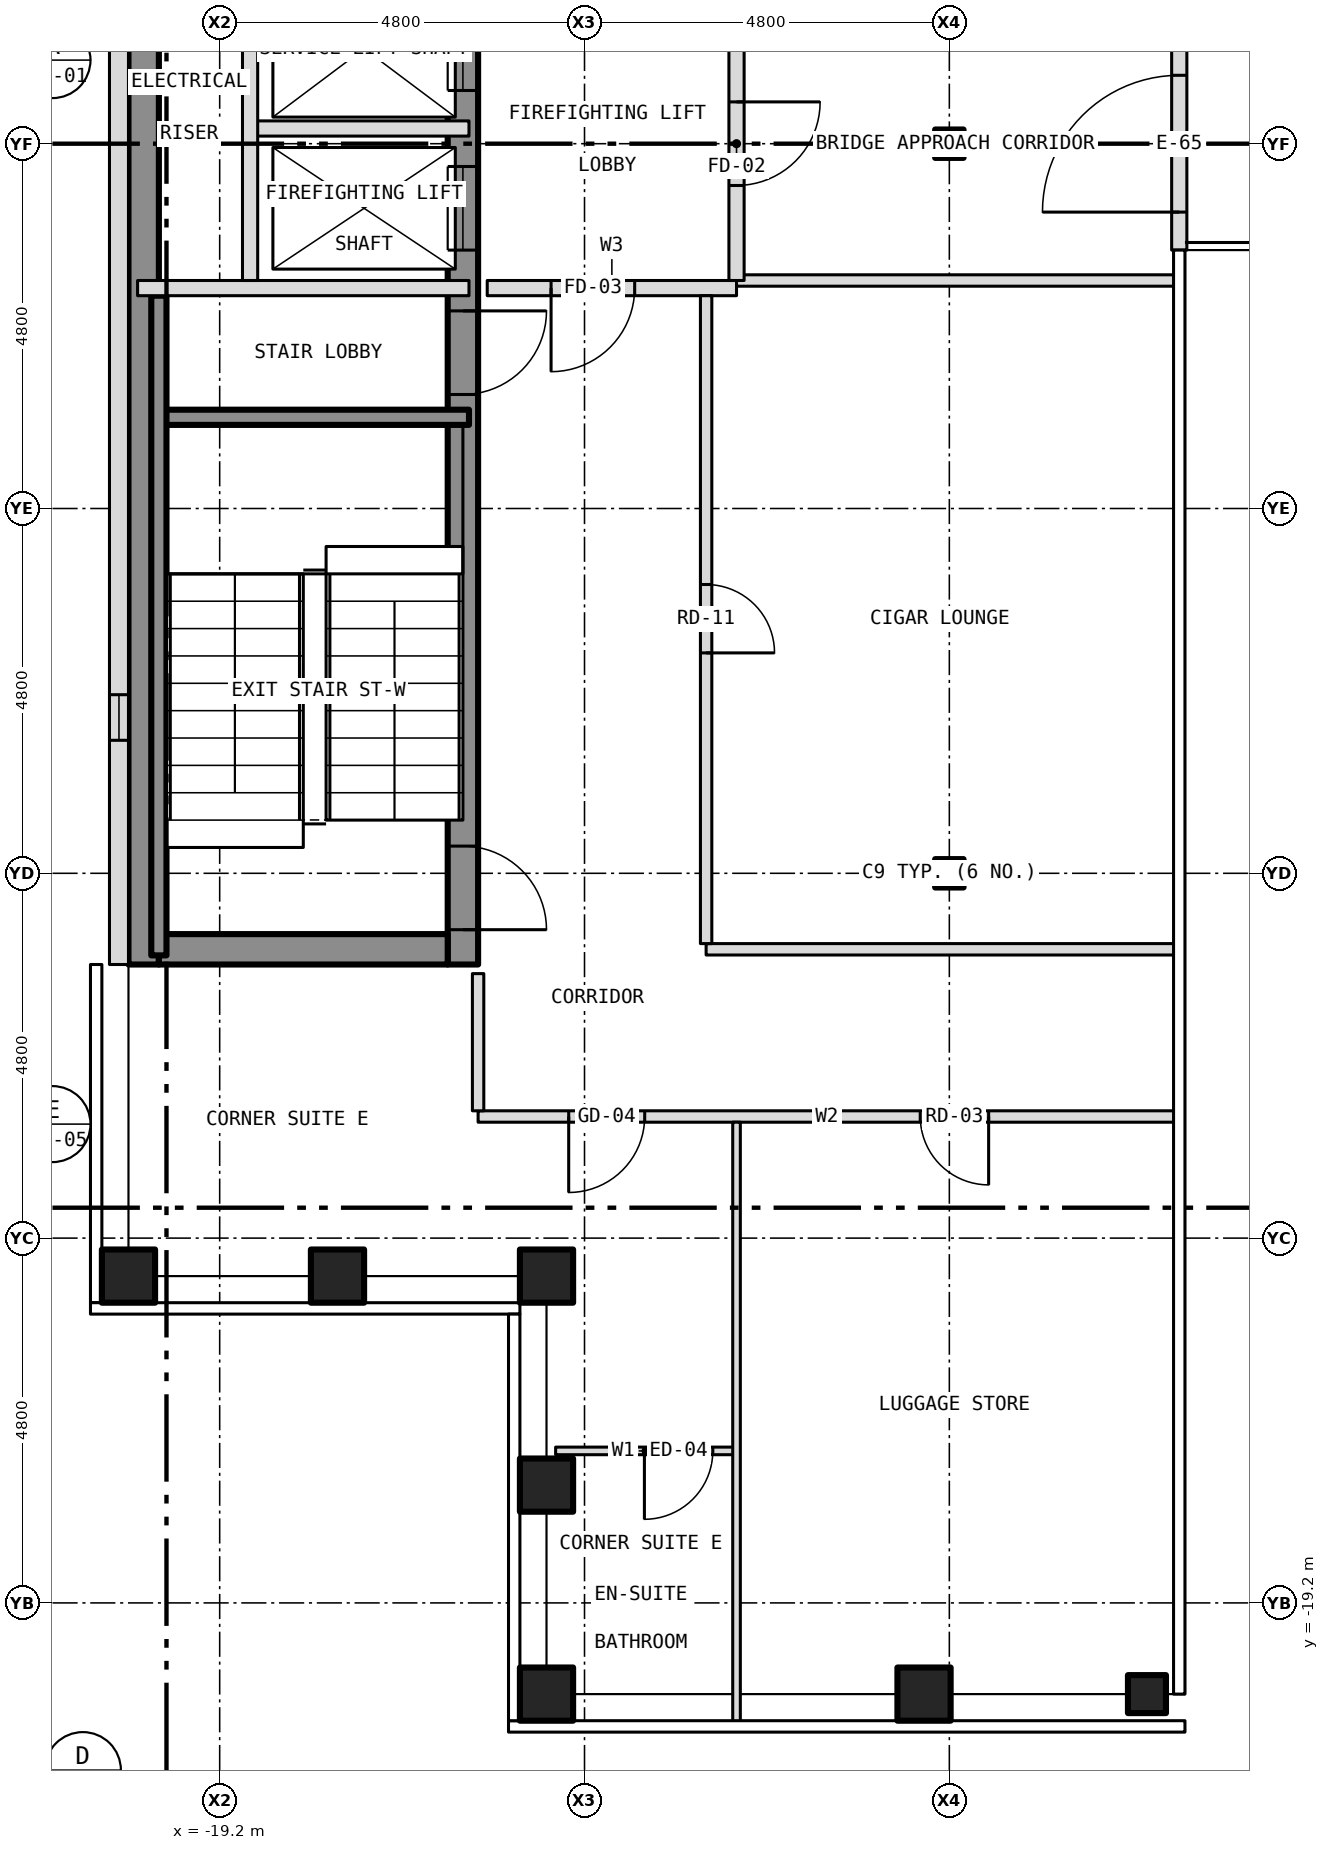
"""IFC4 building model, lengths in metres.
Left out: names, types, materials, properties, quantities, classifications, styles, units other than length and angle.
Written with IfcOpenShell. Run it as: python <this file> out.ifc"""

import sys

from ifc_helpers import new_model, si_unit, direction, frame, frame_2d, origin, origin_2d, place, context, subcontext, project, spatial, rectangle, hollow_rectangle, i_section, extrude, element, fill, save


model = new_model("IFC4")
c1 = context("Model", 3, precision=1e-05, world=origin(), true_north=direction((0.0, 1.0)))
c2 = subcontext(c1, "Body", "Model", "MODEL_VIEW")
j1 = project(units=[si_unit("LENGTHUNIT", "METRE"), si_unit("PLANEANGLEUNIT", "RADIAN")], contexts=[c1])
p1 = place(None, origin())
s1 = spatial("IfcSite", under=j1, at=p1, CompositionType="ELEMENT")
p2 = place(p1, origin())
s2 = spatial("IfcBuilding", under=s1, at=p2, CompositionType="ELEMENT")
p3 = place(p2, frame((0.0, 0.0, 233.0)))
s3 = spatial("IfcBuildingStorey", under=s2, at=p3, CompositionType="ELEMENT", Elevation=233.0)
for number, where, z_axis, x_axis in (
    (1, (-14.9, -20.4, -0.15), (0.0, 0.0, 1.0), (1.0, 0.0, 0.0)),
    (2, (-9.933, -20.4, -0.15), (0.0, 0.0, 1.0), (1.0, 0.0, 0.0)),
    (3, (-20.4, -14.9, -0.15), (0.0, 0.0, 1.0), (1.0, 0.0, 0.0)),
    (4, (-14.9, -14.9, -0.15), (0.0, 0.0, 1.0), (1.0, 0.0, 0.0)),
    (5, (-14.9, -17.65, -0.15), (0.0, 0.0, 1.0), (1.0, 0.0, 0.0)),
    (6, (-17.65, -14.9, -0.15), (0.0, 0.0, 1.0), (1.0, 0.0, 0.0)),
):
    element("IfcColumn", number, at=place(p3, frame(where, z_axis=z_axis, x_axis=x_axis)), inside=s3, PredefinedType="COLUMN", context=c2, shape_type="SweptSolid", body=[
        extrude(hollow_rectangle(XDim=0.7, YDim=0.7, WallThickness=0.04, at=origin_2d()), origin(), (0.0, 0.0, 1.0), 3.35),
    ])
p4 = place(p3, frame((-7.0, -20.4, -0.15), z_axis=(0.0, 0.0, 1.0), x_axis=(1.0, 0.0, 0.0)))
e7 = element("IfcColumn", 7, at=p4, inside=s3, PredefinedType="COLUMN", context=c2, shape_type="SweptSolid", body=[
    extrude(hollow_rectangle(XDim=0.5, YDim=0.5, WallThickness=0.03, at=origin_2d()), origin(), (0.0, 0.0, 1.0), 3.35),
])
for number, where, z_axis, x_axis in (
    (8, (-9.6, -9.6, -0.15), (0.0, 0.0, 1.0), (1.0, 0.0, 0.0)),
    (9, (-9.6, 0.0, -0.15), (0.0, 0.0, 1.0), (1.0, 0.0, 0.0)),
):
    element("IfcColumn", number, at=place(p3, frame(where, z_axis=z_axis, x_axis=x_axis)), inside=s3, PredefinedType="COLUMN", context=c2, shape_type="SweptSolid", body=[
        extrude(i_section(OverallWidth=0.373, OverallDepth=0.373, WebThickness=0.016, FlangeThickness=0.026, at=origin_2d()), origin(), (0.0, 0.0, 1.0), 3.35),
    ])
p5 = place(p3, frame((-16.0, -10.8, 0.0), z_axis=(0.0, 0.0, 1.0), x_axis=(0.0, 1.0, 0.0)))
e10 = element("IfcWall", 10, at=p5, inside=s3, PredefinedType="SHEAR", context=c2, shape_type="SweptSolid", body=[
    extrude(rectangle(XDim=21.6, YDim=0.4, at=frame_2d((10.8, 0.0))), origin(), (0.0, 0.0, 1.0), 2.9),
])
p6 = place(p5, frame((9.4, 0.0, 0.0)))
e11 = element("IfcOpeningElement", 11, at=p6, cuts=e10, PredefinedType="OPENING", context=c2, shape_type="SweptSolid", body=[
    extrude(rectangle(XDim=1.1, YDim=2.1, at=frame_2d((0.55, 1.05))), frame((0.0, 0.212, 0.0), z_axis=(0.0, -1.0, 0.0), x_axis=(1.0, 0.0, 0.0)), (0.0, 0.0, 1.0), 0.424),
])
p7 = place(p5, frame((11.5, 0.0, 0.0)))
e12 = element("IfcOpeningElement", 12, at=p7, cuts=e10, PredefinedType="OPENING", context=c2, shape_type="SweptSolid", body=[
    extrude(rectangle(XDim=1.1, YDim=2.1, at=frame_2d((0.55, 1.05))), frame((0.0, 0.212, 0.0), z_axis=(0.0, -1.0, 0.0), x_axis=(1.0, 0.0, 0.0)), (0.0, 0.0, 1.0), 0.424),
])
p8 = place(p5, frame((13.6, 0.0, 0.0)))
e13 = element("IfcOpeningElement", 13, at=p8, cuts=e10, PredefinedType="OPENING", context=c2, shape_type="SweptSolid", body=[
    extrude(rectangle(XDim=1.1, YDim=2.1, at=frame_2d((0.55, 1.05))), frame((0.0, 0.212, 0.0), z_axis=(0.0, -1.0, 0.0), x_axis=(1.0, 0.0, 0.0)), (0.0, 0.0, 1.0), 0.424),
])
p9 = place(p5, frame((15.7, 0.0, 0.0)))
e14 = element("IfcOpeningElement", 14, at=p9, cuts=e10, PredefinedType="OPENING", context=c2, shape_type="SweptSolid", body=[
    extrude(rectangle(XDim=1.1, YDim=2.1, at=frame_2d((0.55, 1.05))), frame((0.0, 0.212, 0.0), z_axis=(0.0, -1.0, 0.0), x_axis=(1.0, 0.0, 0.0)), (0.0, 0.0, 1.0), 0.424),
])
p10 = place(p5, frame((17.8, 0.0, 0.0)))
e15 = element("IfcOpeningElement", 15, at=p10, cuts=e10, PredefinedType="OPENING", context=c2, shape_type="SweptSolid", body=[
    extrude(rectangle(XDim=1.1, YDim=2.1, at=frame_2d((0.55, 1.05))), frame((0.0, 0.212, 0.0), z_axis=(0.0, -1.0, 0.0), x_axis=(1.0, 0.0, 0.0)), (0.0, 0.0, 1.0), 0.424),
])
p11 = place(p5, frame((0.458, 0.0, 0.0)))
e16 = element("IfcOpeningElement", 16, at=p11, cuts=e10, PredefinedType="OPENING", context=c2, shape_type="SweptSolid", body=[
    extrude(rectangle(XDim=1.1, YDim=2.1, at=frame_2d((0.55, 1.05))), frame((0.0, 0.212, 0.0), z_axis=(0.0, -1.0, 0.0), x_axis=(1.0, 0.0, 0.0)), (0.0, 0.0, 1.0), 0.424),
])
p12 = place(p5, frame((7.5, 0.0, 0.0)))
e17 = element("IfcOpeningElement", 17, at=p12, cuts=e10, PredefinedType="OPENING", context=c2, shape_type="SweptSolid", body=[
    extrude(rectangle(XDim=1.1, YDim=2.1, at=frame_2d((0.55, 1.05))), frame((0.0, 0.212, 0.0), z_axis=(0.0, -1.0, 0.0), x_axis=(1.0, 0.0, 0.0)), (0.0, 0.0, 1.0), 0.424),
])
p13 = place(p5, frame((20.0, 0.0, 0.0)))
e18 = element("IfcOpeningElement", 18, at=p13, cuts=e10, PredefinedType="OPENING", context=c2, shape_type="SweptSolid", body=[
    extrude(rectangle(XDim=0.9, YDim=2.1, at=frame_2d((0.45, 1.05))), frame((0.0, 0.212, 0.0), z_axis=(0.0, -1.0, 0.0), x_axis=(1.0, 0.0, 0.0)), (0.0, 0.0, 1.0), 0.424),
])
p14 = place(p3, frame((-20.2, -10.8, 0.0), z_axis=(0.0, 0.0, 1.0), x_axis=(0.0, 1.0, 0.0)))
e19 = element("IfcWall", 19, at=p14, inside=s3, PredefinedType="SHEAR", context=c2, shape_type="SweptSolid", body=[
    extrude(rectangle(XDim=21.6, YDim=0.4, at=frame_2d((10.8, 0.0))), origin(), (0.0, 0.0, 1.0), 2.9),
])
p15 = place(p3, frame((-20.0, -10.6, 0.0), z_axis=(0.0, 0.0, 1.0), x_axis=(1.0, 0.0, 0.0)))
e20 = element("IfcWall", 20, at=p15, inside=s3, PredefinedType="SHEAR", context=c2, shape_type="SweptSolid", body=[
    extrude(rectangle(XDim=3.8, YDim=0.4, at=frame_2d((1.9, 0.0))), origin(), (0.0, 0.0, 1.0), 2.9),
])
p16 = place(p3, frame((-20.525, 10.8, 0.0), z_axis=(0.0, 0.0, 1.0), x_axis=(0.0, -1.0, 0.0)))
e21 = element("IfcWall", 21, at=p16, inside=s3, PredefinedType="SOLIDWALL", context=c2, shape_type="SweptSolid", body=[
    extrude(rectangle(XDim=21.6, YDim=0.25, at=frame_2d((10.8, 0.0))), origin(), (0.0, 0.0, 1.0), 3.5),
])
p17 = place(p16, frame((18.05, 0.0, 1.0)))
e22 = element("IfcOpeningElement", 22, at=p17, cuts=e21, PredefinedType="OPENING", context=c2, shape_type="SweptSolid", body=[
    extrude(rectangle(XDim=0.6, YDim=1.5, at=frame_2d((0.3, 0.75))), frame((0.0, 0.137, 0.0), z_axis=(0.0, -1.0, 0.0), x_axis=(1.0, 0.0, 0.0)), (0.0, 0.0, 1.0), 0.274),
])
p18 = place(p3, frame((-6.575, -1.4, 0.0), z_axis=(0.0, 0.0, 1.0), x_axis=(0.0, 1.0, 0.0)))
e23 = element("IfcWall", 23, at=p18, inside=s3, PredefinedType="SOLIDWALL", context=c2, shape_type="SweptSolid", body=[
    extrude(rectangle(XDim=2.8, YDim=0.2, at=frame_2d((1.4, 0.0))), origin(), (0.0, 0.0, 1.0), 3.5),
])
p19 = place(p18, frame((0.5, 0.0, 0.0)))
e24 = element("IfcOpeningElement", 24, at=p19, cuts=e23, PredefinedType="OPENING", context=c2, shape_type="SweptSolid", body=[
    extrude(rectangle(XDim=1.8, YDim=2.1, at=frame_2d((0.9, 1.05))), frame((0.0, 0.112, 0.0), z_axis=(0.0, -1.0, 0.0), x_axis=(1.0, 0.0, 0.0)), (0.0, 0.0, 1.0), 0.224),
])
p20 = place(p3, frame((-14.78, -17.2, 0.0), z_axis=(0.0, 0.0, 1.0), x_axis=(1.0, 0.0, 0.0)))
e25 = element("IfcWall", 25, at=p20, inside=s3, PredefinedType="PARTITIONING", context=c2, shape_type="SweptSolid", body=[
    extrude(rectangle(XDim=2.38, YDim=0.1, at=frame_2d((1.19, 0.0))), origin(), (0.0, 0.0, 1.0), 3.2),
])
p21 = place(p20, frame((1.168, 0.0, 0.0)))
e26 = element("IfcOpeningElement", 26, at=p21, cuts=e25, PredefinedType="OPENING", context=c2, shape_type="SweptSolid", body=[
    extrude(rectangle(XDim=0.9, YDim=2.1, at=frame_2d((0.45, 1.05))), frame((0.0, 0.062, 0.0), z_axis=(0.0, -1.0, 0.0), x_axis=(1.0, 0.0, 0.0)), (0.0, 0.0, 1.0), 0.124),
])
p22 = place(p3, frame((-15.8, -12.8, 0.0), z_axis=(0.0, 0.0, 1.0), x_axis=(1.0, 0.0, 0.0)))
e27 = element("IfcWall", 27, at=p22, inside=s3, PredefinedType="PARTITIONING", context=c2, shape_type="SweptSolid", body=[
    extrude(rectangle(XDim=9.18, YDim=0.15, at=frame_2d((4.59, 0.0))), origin(), (0.0, 0.0, 1.0), 3.2),
])
p23 = place(p22, frame((5.817, 0.0, 0.0)))
e28 = element("IfcOpeningElement", 28, at=p23, cuts=e27, PredefinedType="OPENING", context=c2, shape_type="SweptSolid", body=[
    extrude(rectangle(XDim=0.9, YDim=2.1, at=frame_2d((0.45, 1.05))), frame((0.0, 0.087, 0.0), z_axis=(0.0, -1.0, 0.0), x_axis=(1.0, 0.0, 0.0)), (0.0, 0.0, 1.0), 0.174),
])
p24 = place(p22, frame((1.192, 0.0, 0.0)))
e29 = element("IfcOpeningElement", 29, at=p24, cuts=e27, PredefinedType="OPENING", context=c2, shape_type="SweptSolid", body=[
    extrude(rectangle(XDim=1.0, YDim=2.1, at=frame_2d((0.5, 1.05))), frame((0.0, 0.087, 0.0), z_axis=(0.0, -1.0, 0.0), x_axis=(1.0, 0.0, 0.0)), (0.0, 0.0, 1.0), 0.174),
])
p25 = place(p3, frame((-12.8, -10.6, 0.0), z_axis=(0.0, 0.0, 1.0), x_axis=(1.0, 0.0, 0.0)))
e30 = element("IfcWall", 30, at=p25, inside=s3, PredefinedType="PARTITIONING", context=c2, shape_type="SweptSolid", body=[
    extrude(rectangle(XDim=6.18, YDim=0.15, at=frame_2d((3.09, 0.0))), origin(), (0.0, 0.0, 1.0), 3.2),
])
p26 = place(p3, frame((-20.0, -3.6, 0.0), z_axis=(0.0, 0.0, 1.0), x_axis=(1.0, 0.0, 0.0)))
e31 = element("IfcWall", 31, at=p26, inside=s3, PredefinedType="SHEAR", context=c2, shape_type="SweptSolid", body=[
    extrude(rectangle(XDim=4.08, YDim=0.2, at=frame_2d((2.04, 0.0))), origin(), (0.0, 0.0, 1.0), 2.9),
])
p27 = place(p3, frame((-20.28, -1.9, 0.0), z_axis=(0.0, 0.0, 1.0), x_axis=(1.0, 0.0, 0.0)))
e32 = element("IfcWall", 32, at=p27, inside=s3, PredefinedType="PARTITIONING", context=c2, shape_type="SweptSolid", body=[
    extrude(rectangle(XDim=4.36, YDim=0.2, at=frame_2d((2.18, 0.0))), origin(), (0.0, 0.0, 1.0), 2.9),
])
p28 = place(p3, frame((-15.68, -1.9, 0.0), z_axis=(0.0, 0.0, 1.0), x_axis=(1.0, 0.0, 0.0)))
e33 = element("IfcWall", 33, at=p28, inside=s3, PredefinedType="PARTITIONING", context=c2, shape_type="SweptSolid", body=[
    extrude(rectangle(XDim=3.28, YDim=0.2, at=frame_2d((1.64, 0.0))), origin(), (0.0, 0.0, 1.0), 3.2),
])
p29 = place(p28, frame((0.84, 0.0, 0.0)))
e34 = element("IfcOpeningElement", 34, at=p29, cuts=e33, PredefinedType="OPENING", context=c2, shape_type="SweptSolid", body=[
    extrude(rectangle(XDim=1.1, YDim=2.1, at=frame_2d((0.55, 1.05))), frame((0.0, 0.112, 0.0), z_axis=(0.0, -1.0, 0.0), x_axis=(1.0, 0.0, 0.0)), (0.0, 0.0, 1.0), 0.224),
])
p30 = place(p3, frame((-12.4, -1.8, 0.0), z_axis=(0.0, 0.0, 1.0), x_axis=(1.0, 0.0, 0.0)))
e35 = element("IfcWall", 35, at=p30, inside=s3, PredefinedType="PARTITIONING", context=c2, shape_type="SweptSolid", body=[
    extrude(rectangle(XDim=5.78, YDim=0.15, at=frame_2d((2.89, 0.0))), origin(), (0.0, 0.0, 1.0), 3.2),
])
p31 = place(p3, frame((-18.8, 0.2, 0.0), z_axis=(0.0, 0.0, 1.0), x_axis=(1.0, 0.0, 0.0)))
e36 = element("IfcWall", 36, at=p31, inside=s3, PredefinedType="PARTITIONING", context=c2, shape_type="SweptSolid", body=[
    extrude(rectangle(XDim=2.88, YDim=0.2, at=frame_2d((1.44, 0.0))), origin(), (0.0, 0.0, 1.0), 2.9),
])
p32 = place(p3, frame((-20.0, -10.68, 0.0), z_axis=(0.0, 0.0, 1.0), x_axis=(0.0, 1.0, 0.0)))
e37 = element("IfcWall", 37, at=p32, inside=s3, PredefinedType="SHEAR", context=c2, shape_type="SweptSolid", body=[
    extrude(rectangle(XDim=8.68, YDim=0.2, at=frame_2d((4.34, 0.0))), origin(), (0.0, 0.0, 1.0), 2.9),
])
p33 = place(p3, frame((-18.8, -1.8, 0.0), z_axis=(0.0, 0.0, 1.0), x_axis=(0.0, 1.0, 0.0)))
e38 = element("IfcWall", 38, at=p33, inside=s3, PredefinedType="PARTITIONING", context=c2, shape_type="SweptSolid", body=[
    extrude(rectangle(XDim=12.48, YDim=0.2, at=frame_2d((6.24, 0.0))), origin(), (0.0, 0.0, 1.0), 2.9),
])
p34 = place(p3, frame((-15.8, -12.725, 0.0), z_axis=(0.0, 0.0, 1.0), x_axis=(0.0, 1.0, 0.0)))
e39 = element("IfcWall", 39, at=p34, inside=s3, PredefinedType="PARTITIONING", context=c2, shape_type="SweptSolid", body=[
    extrude(rectangle(XDim=1.805, YDim=0.15, at=frame_2d((0.903, 0.0))), origin(), (0.0, 0.0, 1.0), 3.2),
])
p35 = place(p3, frame((-12.8, -10.525, 0.0), z_axis=(0.0, 0.0, 1.0), x_axis=(0.0, 1.0, 0.0)))
e40 = element("IfcWall", 40, at=p35, inside=s3, PredefinedType="PARTITIONING", context=c2, shape_type="SweptSolid", body=[
    extrude(rectangle(XDim=8.525, YDim=0.15, at=frame_2d((4.262, 0.0))), origin(), (0.0, 0.0, 1.0), 3.2),
])
p36 = place(p35, frame((3.825, 0.0, 0.0)))
e41 = element("IfcOpeningElement", 41, at=p36, cuts=e40, PredefinedType="OPENING", context=c2, shape_type="SweptSolid", body=[
    extrude(rectangle(XDim=0.9, YDim=2.1, at=frame_2d((0.45, 1.05))), frame((0.0, 0.087, 0.0), z_axis=(0.0, -1.0, 0.0), x_axis=(1.0, 0.0, 0.0)), (0.0, 0.0, 1.0), 0.174),
])
p37 = place(p3, frame((-12.4, -20.78, 0.0), z_axis=(0.0, 0.0, 1.0), x_axis=(0.0, 1.0, 0.0)))
e42 = element("IfcWall", 42, at=p37, inside=s3, PredefinedType="PARTITIONING", context=c2, shape_type="SweptSolid", body=[
    extrude(rectangle(XDim=7.905, YDim=0.1, at=frame_2d((3.953, 0.0))), origin(), (0.0, 0.0, 1.0), 3.2),
])
p38 = place(p3, frame((-12.4, -1.8, 0.0), z_axis=(0.0, 0.0, 1.0), x_axis=(0.0, 1.0, 0.0)))
e43 = element("IfcWall", 43, at=p38, inside=s3, PredefinedType="PARTITIONING", context=c2, shape_type="SweptSolid", body=[
    extrude(rectangle(XDim=4.0, YDim=0.2, at=frame_2d((2.0, 0.0))), origin(), (0.0, 0.0, 1.0), 3.2),
])
p39 = place(p38, frame((1.25, 0.0, 0.0)))
e44 = element("IfcOpeningElement", 44, at=p39, cuts=e43, PredefinedType="OPENING", context=c2, shape_type="SweptSolid", body=[
    extrude(rectangle(XDim=1.1, YDim=2.1, at=frame_2d((0.55, 1.05))), frame((0.0, 0.112, 0.0), z_axis=(0.0, -1.0, 0.0), x_axis=(1.0, 0.0, 0.0)), (0.0, 0.0, 1.0), 0.224),
])
p40 = place(p17, origin())
e45 = element("IfcWindow", 45, at=p40, inside=s3, PartitioningType="SINGLE_PANEL", PredefinedType="WINDOW", context=c2, shape_type="SweptSolid", body=[
    extrude(rectangle(XDim=0.6, YDim=1.5, at=frame_2d((0.3, 0.75))), frame((0.0, -0.035, 0.0), z_axis=(0.0, -1.0, 0.0), x_axis=(1.0, 0.0, 0.0)), (0.0, 0.0, 1.0), 0.06),
])
fill(e22, e45)
p41 = place(p19, origin())
e46 = element("IfcDoor", 46, at=p41, inside=s3, OperationType="DOUBLE_DOOR_DOUBLE_SWING", PredefinedType="DOOR", context=c2, shape_type="SweptSolid", body=[
    extrude(rectangle(XDim=1.8, YDim=2.1, at=frame_2d((0.9, 1.05))), frame((0.0, 0.025, 0.0), z_axis=(0.0, -1.0, 0.0), x_axis=(1.0, 0.0, 0.0)), (0.0, 0.0, 1.0), 0.05),
])
fill(e24, e46)
p42 = place(p6, origin())
e47 = element("IfcDoor", 47, at=p42, inside=s3, OperationType="SLIDING_TO_LEFT", PredefinedType="DOOR", context=c2, shape_type="SweptSolid", body=[
    extrude(rectangle(XDim=1.1, YDim=2.1, at=frame_2d((0.55, 1.05))), frame((0.0, 0.025, 0.0), z_axis=(0.0, -1.0, 0.0), x_axis=(1.0, 0.0, 0.0)), (0.0, 0.0, 1.0), 0.05),
])
fill(e11, e47)
p43 = place(p7, origin())
e48 = element("IfcDoor", 48, at=p43, inside=s3, OperationType="SLIDING_TO_LEFT", PredefinedType="DOOR", context=c2, shape_type="SweptSolid", body=[
    extrude(rectangle(XDim=1.1, YDim=2.1, at=frame_2d((0.55, 1.05))), frame((0.0, 0.025, 0.0), z_axis=(0.0, -1.0, 0.0), x_axis=(1.0, 0.0, 0.0)), (0.0, 0.0, 1.0), 0.05),
])
fill(e12, e48)
p44 = place(p11, origin())
e49 = element("IfcDoor", 49, at=p44, inside=s3, OperationType="SINGLE_SWING_LEFT", PredefinedType="DOOR", context=c2, shape_type="SweptSolid", body=[
    extrude(rectangle(XDim=1.1, YDim=2.1, at=frame_2d((0.55, 1.05))), frame((0.0, 0.025, 0.0), z_axis=(0.0, -1.0, 0.0), x_axis=(1.0, 0.0, 0.0)), (0.0, 0.0, 1.0), 0.05),
])
fill(e16, e49)
p45 = place(p12, origin())
e50 = element("IfcDoor", 50, at=p45, inside=s3, OperationType="SINGLE_SWING_RIGHT", PredefinedType="DOOR", context=c2, shape_type="SweptSolid", body=[
    extrude(rectangle(XDim=1.1, YDim=2.1, at=frame_2d((0.55, 1.05))), frame((0.0, 0.025, 0.0), z_axis=(0.0, -1.0, 0.0), x_axis=(1.0, 0.0, 0.0)), (0.0, 0.0, 1.0), 0.05),
])
fill(e17, e50)
p46 = place(p39, origin())
e51 = element("IfcDoor", 51, at=p46, inside=s3, OperationType="SINGLE_SWING_RIGHT", PredefinedType="DOOR", context=c2, shape_type="SweptSolid", body=[
    extrude(rectangle(XDim=1.1, YDim=2.1, at=frame_2d((0.55, 1.05))), frame((0.0, 0.025, 0.0), z_axis=(0.0, -1.0, 0.0), x_axis=(1.0, 0.0, 0.0)), (0.0, 0.0, 1.0), 0.05),
])
fill(e44, e51)
p47 = place(p29, origin())
e52 = element("IfcDoor", 52, at=p47, inside=s3, OperationType="SINGLE_SWING_LEFT", PredefinedType="DOOR", context=c2, shape_type="SweptSolid", body=[
    extrude(rectangle(XDim=1.1, YDim=2.1, at=frame_2d((0.55, 1.05))), frame((0.0, 0.025, 0.0), z_axis=(0.0, -1.0, 0.0), x_axis=(1.0, 0.0, 0.0)), (0.0, 0.0, 1.0), 0.05),
])
fill(e34, e52)
p48 = place(p23, origin())
e53 = element("IfcDoor", 53, at=p48, inside=s3, OperationType="SINGLE_SWING_RIGHT", PredefinedType="DOOR", context=c2, shape_type="SweptSolid", body=[
    extrude(rectangle(XDim=0.9, YDim=2.1, at=frame_2d((0.45, 1.05))), frame((0.0, 0.025, 0.0), z_axis=(0.0, -1.0, 0.0), x_axis=(1.0, 0.0, 0.0)), (0.0, 0.0, 1.0), 0.05),
])
fill(e28, e53)
p49 = place(p21, origin())
e54 = element("IfcDoor", 54, at=p49, inside=s3, OperationType="SINGLE_SWING_LEFT", PredefinedType="DOOR", context=c2, shape_type="SweptSolid", body=[
    extrude(rectangle(XDim=0.9, YDim=2.1, at=frame_2d((0.45, 1.05))), frame((0.0, 0.025, 0.0), z_axis=(0.0, -1.0, 0.0), x_axis=(1.0, 0.0, 0.0)), (0.0, 0.0, 1.0), 0.05),
])
fill(e26, e54)
p50 = place(p24, origin())
e55 = element("IfcDoor", 55, at=p50, inside=s3, OperationType="SINGLE_SWING_LEFT", PredefinedType="DOOR", context=c2, shape_type="SweptSolid", body=[
    extrude(rectangle(XDim=1.0, YDim=2.1, at=frame_2d((0.5, 1.05))), frame((0.0, 0.025, 0.0), z_axis=(0.0, -1.0, 0.0), x_axis=(1.0, 0.0, 0.0)), (0.0, 0.0, 1.0), 0.05),
])
fill(e29, e55)
p51 = place(p36, origin())
e56 = element("IfcDoor", 56, at=p51, inside=s3, OperationType="SINGLE_SWING_LEFT", PredefinedType="DOOR", context=c2, shape_type="SweptSolid", body=[
    extrude(rectangle(XDim=0.9, YDim=2.1, at=frame_2d((0.45, 1.05))), frame((0.0, 0.025, 0.0), z_axis=(0.0, -1.0, 0.0), x_axis=(1.0, 0.0, 0.0)), (0.0, 0.0, 1.0), 0.05),
])
fill(e41, e56)
save(model, sys.argv[1])
